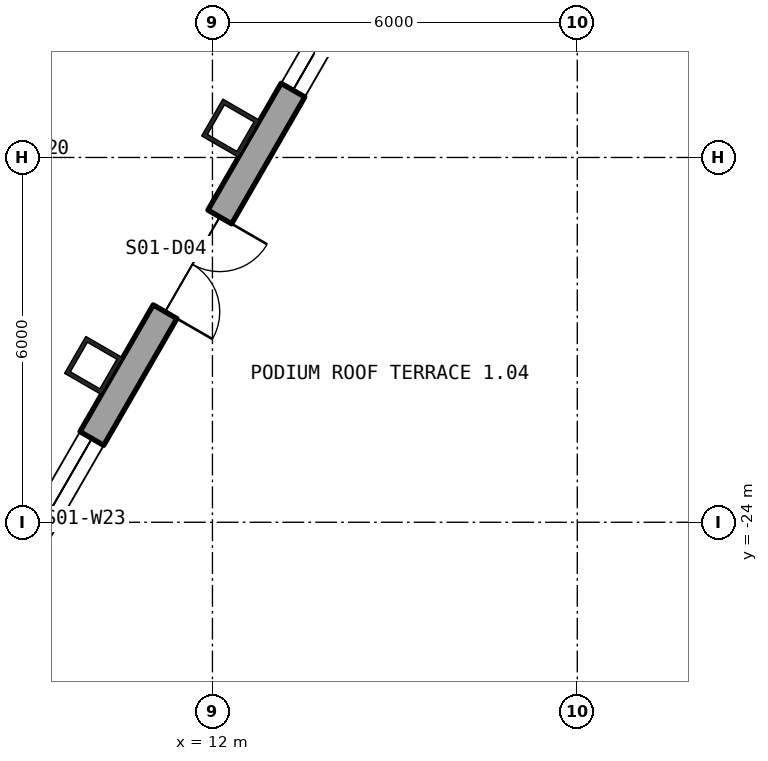
"""IFC4 building model, lengths in metres.
Left out: names, types, materials, properties, quantities, classifications, styles, units other than length and angle.
Written with IfcOpenShell. Run it as: python <this file> out.ifc"""

import sys

from ifc_helpers import new_model, si_unit, direction, frame, frame_2d, origin, origin_2d, place, context, subcontext, project, spatial, polyline, rectangle, hollow_rectangle, outline, extrude, element, fill, save


model = new_model("IFC4")
c1 = context("Model", 3, precision=1e-05, world=origin(), true_north=direction((0.0, 1.0)))
c2 = subcontext(c1, "Body", "Model", "MODEL_VIEW")
j1 = project(units=[si_unit("LENGTHUNIT", "METRE"), si_unit("PLANEANGLEUNIT", "RADIAN")], contexts=[c1])
p1 = place(None, origin())
s1 = spatial("IfcSite", under=j1, at=p1, CompositionType="ELEMENT")
p2 = place(p1, origin())
s2 = spatial("IfcBuilding", under=s1, at=p2, CompositionType="ELEMENT")
p3 = place(p2, frame((0.0, 0.0, 28.8)))
s3 = spatial("IfcBuildingStorey", under=s2, at=p3, CompositionType="ELEMENT", Elevation=28.8)
p4 = place(p3, frame((10.046, -21.422, 0.0), z_axis=(0.0, 0.0, 1.0), x_axis=(0.5, 0.866025403784, 0.0)))
e1 = element("IfcColumn", 1, at=p4, inside=s3, PredefinedType="COLUMN", context=c2, shape_type="SweptSolid", body=[
    extrude(hollow_rectangle(XDim=0.7, YDim=0.7, WallThickness=0.07, at=origin_2d()), origin(), (0.0, 0.0, 1.0), 4.5),
])
p5 = place(p3, frame((12.3, -17.518, -0.85), z_axis=(0.0, 0.0, 1.0), x_axis=(0.5, 0.866025403784, 0.0)))
e2 = element("IfcColumn", 2, at=p5, inside=s3, PredefinedType="COLUMN", context=c2, shape_type="SweptSolid", body=[
    extrude(hollow_rectangle(XDim=0.7, YDim=0.7, WallThickness=0.07, at=origin_2d()), origin(), (0.0, 0.0, 1.0), 5.35),
])
p6 = place(p3, frame((5.87, -29.805, -0.23), z_axis=(0.0, 0.0, 1.0), x_axis=(0.499999764979, 0.866025539474, 0.0)))
e3 = element("IfcWall", 3, at=p6, inside=s3, PredefinedType="SOLIDWALL", context=c2, shape_type="SweptSolid", body=[
    extrude(outline(polyline([(-0.13, -0.225), (45.87, -0.225), (45.61, 0.225), (0.13, 0.225), (-0.13, -0.225)])), origin(), (0.0, 0.0, 1.0), 4.55),
])
p7 = place(p6, frame((1.424, 0.0, 1.13)))
e4 = element("IfcOpeningElement", 4, at=p7, cuts=e3, PredefinedType="OPENING", context=c2, shape_type="SweptSolid", body=[
    extrude(rectangle(XDim=2.4, YDim=2.6, at=frame_2d((1.2, 1.3))), frame((0.0, 0.235, 0.0), z_axis=(0.0, -1.0, 0.0), x_axis=(1.0, 0.0, 0.0)), (0.0, 0.0, 1.0), 0.47),
])
p8 = place(p6, frame((5.893, 0.0, 1.13)))
e5 = element("IfcOpeningElement", 5, at=p8, cuts=e3, PredefinedType="OPENING", context=c2, shape_type="SweptSolid", body=[
    extrude(rectangle(XDim=2.4, YDim=2.6, at=frame_2d((1.2, 1.3))), frame((0.0, 0.235, 0.0), z_axis=(0.0, -1.0, 0.0), x_axis=(1.0, 0.0, 0.0)), (0.0, 0.0, 1.0), 0.47),
])
p9 = place(p6, frame((10.701, 0.0, 0.23)))
e6 = element("IfcOpeningElement", 6, at=p9, cuts=e3, PredefinedType="OPENING", context=c2, shape_type="SweptSolid", body=[
    extrude(rectangle(XDim=1.8, YDim=2.4, at=frame_2d((0.9, 1.2))), frame((0.0, 0.235, 0.0), z_axis=(0.0, -1.0, 0.0), x_axis=(1.0, 0.0, 0.0)), (0.0, 0.0, 1.0), 0.47),
])
p10 = place(p6, frame((14.909, 0.0, 1.13)))
e7 = element("IfcOpeningElement", 7, at=p10, cuts=e3, PredefinedType="OPENING", context=c2, shape_type="SweptSolid", body=[
    extrude(rectangle(XDim=2.4, YDim=2.6, at=frame_2d((1.2, 1.3))), frame((0.0, 0.235, 0.0), z_axis=(0.0, -1.0, 0.0), x_axis=(1.0, 0.0, 0.0)), (0.0, 0.0, 1.0), 0.47),
])
p11 = place(p6, frame((19.416, 0.0, 1.13)))
e8 = element("IfcOpeningElement", 8, at=p11, cuts=e3, PredefinedType="OPENING", context=c2, shape_type="SweptSolid", body=[
    extrude(rectangle(XDim=2.4, YDim=2.6, at=frame_2d((1.2, 1.3))), frame((0.0, 0.235, 0.0), z_axis=(0.0, -1.0, 0.0), x_axis=(1.0, 0.0, 0.0)), (0.0, 0.0, 1.0), 0.47),
])
p12 = place(p6, frame((23.924, 0.0, 1.13)))
e9 = element("IfcOpeningElement", 9, at=p12, cuts=e3, PredefinedType="OPENING", context=c2, shape_type="SweptSolid", body=[
    extrude(rectangle(XDim=2.4, YDim=2.6, at=frame_2d((1.2, 1.3))), frame((0.0, 0.235, 0.0), z_axis=(0.0, -1.0, 0.0), x_axis=(1.0, 0.0, 0.0)), (0.0, 0.0, 1.0), 0.47),
])
p13 = place(p6, frame((37.447, 0.0, 1.13)))
e10 = element("IfcOpeningElement", 10, at=p13, cuts=e3, PredefinedType="OPENING", context=c2, shape_type="SweptSolid", body=[
    extrude(rectangle(XDim=2.4, YDim=2.6, at=frame_2d((1.2, 1.3))), frame((0.0, 0.235, 0.0), z_axis=(0.0, -1.0, 0.0), x_axis=(1.0, 0.0, 0.0)), (0.0, 0.0, 1.0), 0.47),
])
p14 = place(p6, frame((42.216, 0.0, 0.23)))
e11 = element("IfcOpeningElement", 11, at=p14, cuts=e3, PredefinedType="OPENING", context=c2, shape_type="SweptSolid", body=[
    extrude(rectangle(XDim=1.8, YDim=2.4, at=frame_2d((0.9, 1.2))), frame((0.0, 0.235, 0.0), z_axis=(0.0, -1.0, 0.0), x_axis=(1.0, 0.0, 0.0)), (0.0, 0.0, 1.0), 0.47),
])
p15 = place(p8, origin())
e12 = element("IfcWindow", 12, at=p15, inside=s3, PartitioningType="SINGLE_PANEL", PredefinedType="WINDOW", context=c2, shape_type="SweptSolid", body=[
    extrude(rectangle(XDim=2.4, YDim=2.6, at=frame_2d((1.2, 1.3))), frame((0.0, 0.105, 0.0), z_axis=(0.0, -1.0, 0.0), x_axis=(1.0, 0.0, 0.0)), (0.0, 0.0, 1.0), 0.06),
])
fill(e5, e12)
p16 = place(p9, frame((1.8, 0.0, 0.0), z_axis=(0.0, 0.0, 1.0), x_axis=(-1.0, 0.0, 0.0)))
e13 = element("IfcDoor", 13, at=p16, inside=s3, OperationType="DOUBLE_DOOR_SINGLE_SWING", PredefinedType="DOOR", context=c2, shape_type="SweptSolid", body=[
    extrude(rectangle(XDim=1.8, YDim=2.4, at=frame_2d((0.9, 1.2))), frame((0.0, 0.025, 0.0), z_axis=(0.0, -1.0, 0.0), x_axis=(1.0, 0.0, 0.0)), (0.0, 0.0, 1.0), 0.05),
])
fill(e6, e13)
p17 = place(p10, origin())
e14 = element("IfcWindow", 14, at=p17, inside=s3, PartitioningType="SINGLE_PANEL", PredefinedType="WINDOW", context=c2, shape_type="SweptSolid", body=[
    extrude(rectangle(XDim=2.4, YDim=2.6, at=frame_2d((1.2, 1.3))), frame((0.0, 0.105, 0.0), z_axis=(0.0, -1.0, 0.0), x_axis=(1.0, 0.0, 0.0)), (0.0, 0.0, 1.0), 0.06),
])
fill(e7, e14)
save(model, sys.argv[1])
